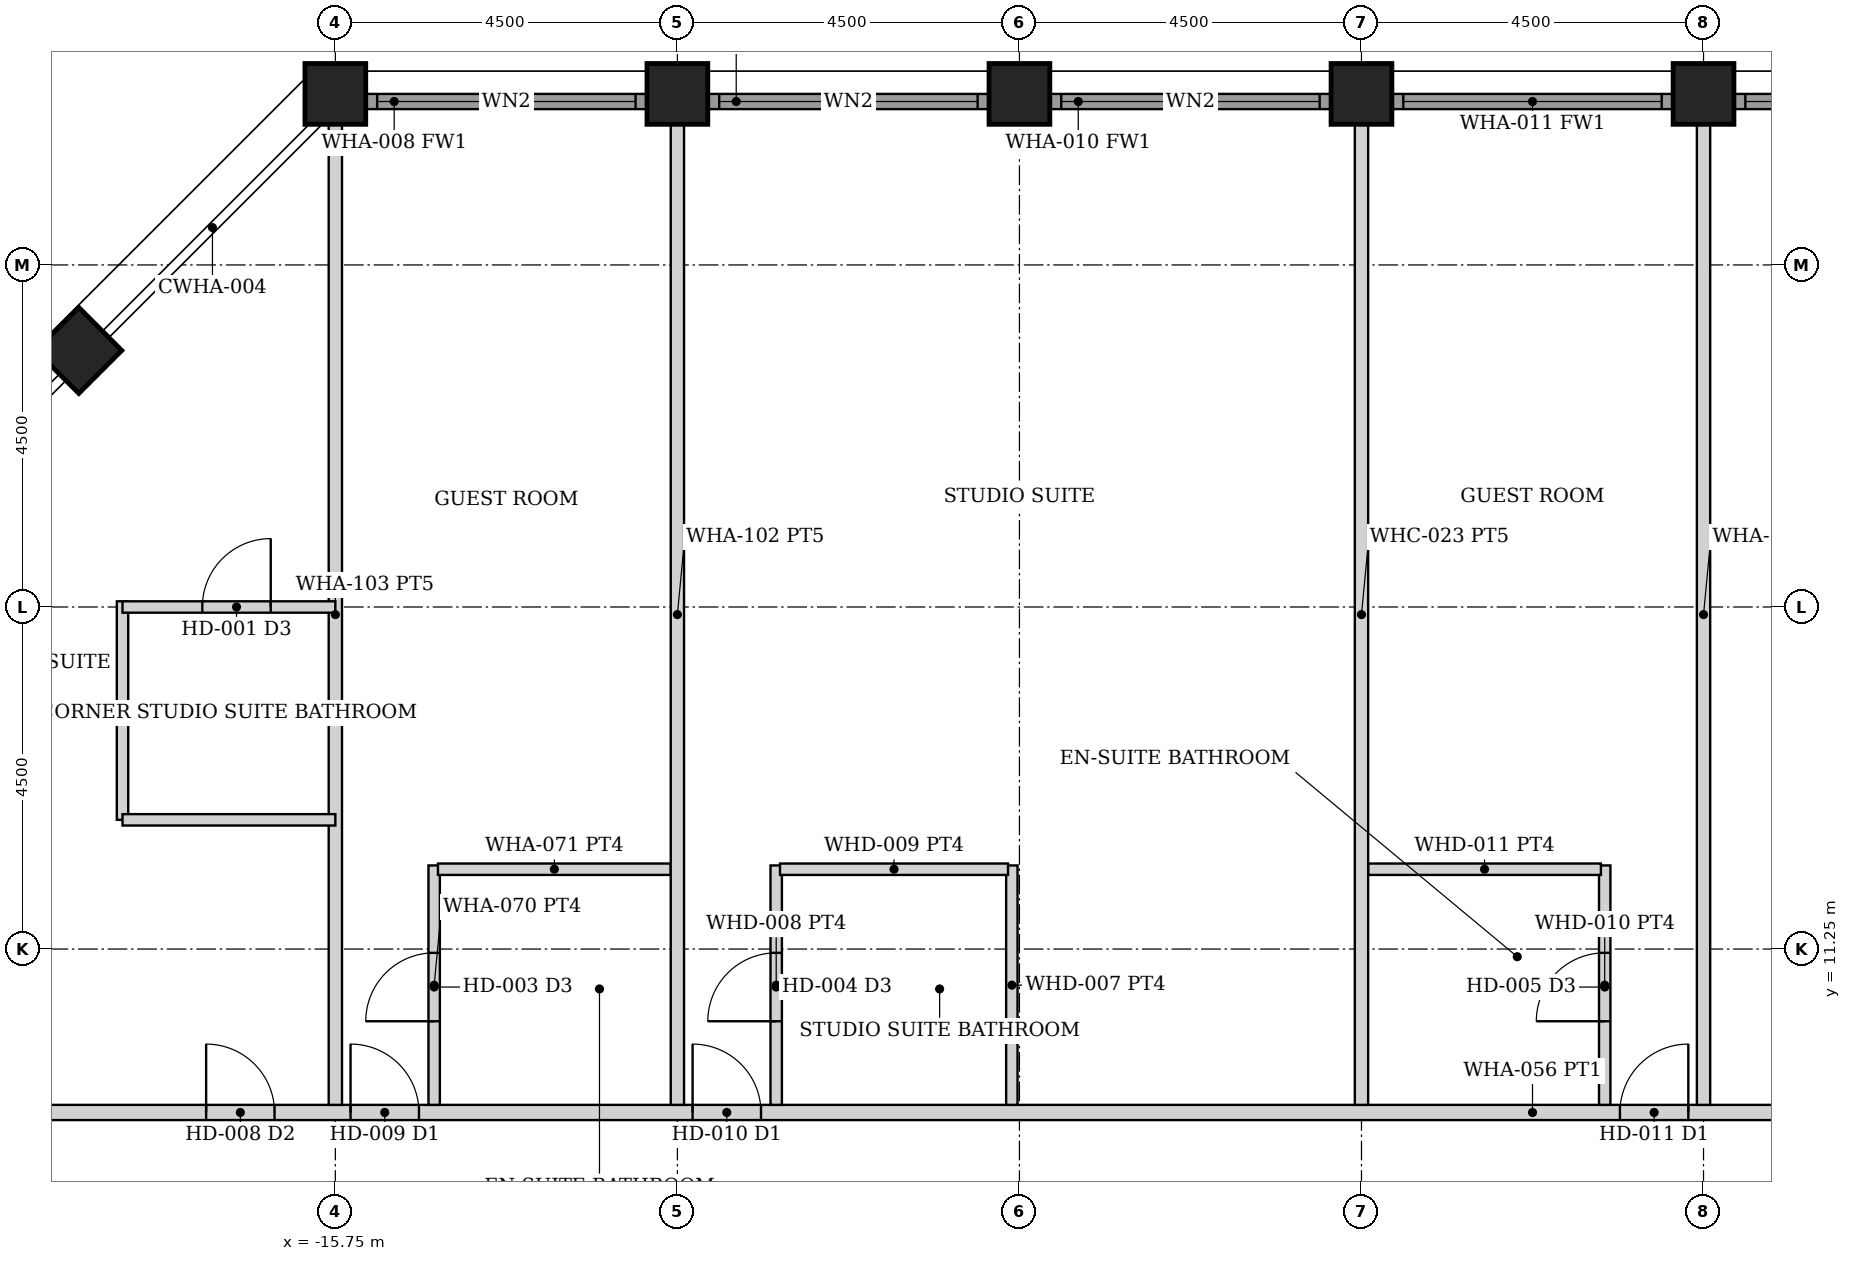
"""IFC4 building model, lengths in metres.
Left out: names, types, materials, properties, quantities, classifications, styles, units other than length and angle.
Written with IfcOpenShell. Run it as: python <this file> out.ifc"""

import sys

from ifc_helpers import new_model, si_unit, direction, frame, frame_2d, origin, origin_2d, place, context, subcontext, project, spatial, rectangle, hollow_rectangle, extrude, element, fill, save


model = new_model("IFC4")
c1 = context("Model", 3, precision=1e-05, world=origin(), true_north=direction((0.0, 1.0)))
c2 = subcontext(c1, "Body", "Model", "MODEL_VIEW")
j1 = project(units=[si_unit("LENGTHUNIT", "METRE"), si_unit("PLANEANGLEUNIT", "RADIAN")], contexts=[c1])
p1 = place(None, origin())
s1 = spatial("IfcSite", under=j1, at=p1, CompositionType="ELEMENT")
p2 = place(p1, origin())
s2 = spatial("IfcBuilding", under=s1, at=p2, CompositionType="ELEMENT")
p3 = place(p2, frame((0.0, 0.0, 150.8)))
s3 = spatial("IfcBuildingStorey", under=s2, at=p3, CompositionType="ELEMENT", Elevation=150.8)
for number, where, z_axis, x_axis in (
    (1, (-15.75, 22.5, 0.0), (0.0, 0.0, 1.0), (0.0, 1.0, 0.0)),
    (2, (-11.25, 22.5, 0.0), (0.0, 0.0, 1.0), (0.0, 1.0, 0.0)),
    (3, (-6.75, 22.5, 0.0), (0.0, 0.0, 1.0), (0.0, 1.0, 0.0)),
    (4, (-2.25, 22.5, 0.0), (0.0, 0.0, 1.0), (0.0, 1.0, 0.0)),
    (5, (2.25, 22.5, 0.0), (0.0, 0.0, 1.0), (0.0, 1.0, 0.0)),
    (6, (-19.125, 19.125, 0.0), (0.0, 0.0, 1.0), (0.707, -0.707, 0.0)),
):
    element("IfcColumn", number, at=place(p3, frame(where, z_axis=z_axis, x_axis=x_axis)), inside=s3, PredefinedType="COLUMN", context=c2, shape_type="SweptSolid", body=[
        extrude(hollow_rectangle(XDim=0.8, YDim=0.8, WallThickness=0.05, at=origin_2d()), origin(), (0.0, 0.0, 1.0), 3.6),
    ])
p4 = place(p3, frame((-15.345, 22.4, 0.0), z_axis=(0.0, 0.0, 1.0), x_axis=(1.0, 0.0, 0.0)))
e7 = element("IfcWall", 7, at=p4, inside=s3, PredefinedType="SOLIDWALL", context=c2, shape_type="SweptSolid", body=[
    extrude(rectangle(XDim=3.69, YDim=0.2, at=frame_2d((1.845, 0.0))), origin(), (0.0, 0.0, 1.0), 2.479),
])
p5 = place(p4, frame((0.145, 0.0, 0.3)))
e8 = element("IfcOpeningElement", 8, at=p5, cuts=e7, PredefinedType="OPENING", context=c2, shape_type="SweptSolid", body=[
    extrude(rectangle(XDim=3.4, YDim=2.029, at=frame_2d((1.7, 1.015))), frame((0.0, 0.11, 0.0), z_axis=(0.0, -1.0, 0.0), x_axis=(1.0, 0.0, 0.0)), (0.0, 0.0, 1.0), 0.22),
])
p6 = place(p3, frame((-10.845, 22.4, 0.0), z_axis=(0.0, 0.0, 1.0), x_axis=(1.0, 0.0, 0.0)))
e9 = element("IfcWall", 9, at=p6, inside=s3, PredefinedType="SOLIDWALL", context=c2, shape_type="SweptSolid", body=[
    extrude(rectangle(XDim=3.69, YDim=0.2, at=frame_2d((1.845, 0.0))), origin(), (0.0, 0.0, 1.0), 2.479),
])
p7 = place(p6, frame((0.145, 0.0, 0.3)))
e10 = element("IfcOpeningElement", 10, at=p7, cuts=e9, PredefinedType="OPENING", context=c2, shape_type="SweptSolid", body=[
    extrude(rectangle(XDim=3.4, YDim=2.029, at=frame_2d((1.7, 1.015))), frame((0.0, 0.11, 0.0), z_axis=(0.0, -1.0, 0.0), x_axis=(1.0, 0.0, 0.0)), (0.0, 0.0, 1.0), 0.22),
])
p8 = place(p3, frame((-6.345, 22.4, 0.0), z_axis=(0.0, 0.0, 1.0), x_axis=(1.0, 0.0, 0.0)))
e11 = element("IfcWall", 11, at=p8, inside=s3, PredefinedType="SOLIDWALL", context=c2, shape_type="SweptSolid", body=[
    extrude(rectangle(XDim=3.69, YDim=0.2, at=frame_2d((1.845, 0.0))), origin(), (0.0, 0.0, 1.0), 2.479),
])
p9 = place(p8, frame((0.145, 0.0, 0.3)))
e12 = element("IfcOpeningElement", 12, at=p9, cuts=e11, PredefinedType="OPENING", context=c2, shape_type="SweptSolid", body=[
    extrude(rectangle(XDim=3.4, YDim=2.029, at=frame_2d((1.7, 1.015))), frame((0.0, 0.11, 0.0), z_axis=(0.0, -1.0, 0.0), x_axis=(1.0, 0.0, 0.0)), (0.0, 0.0, 1.0), 0.22),
])
p10 = place(p3, frame((-1.845, 22.4, 0.0), z_axis=(0.0, 0.0, 1.0), x_axis=(1.0, 0.0, 0.0)))
e13 = element("IfcWall", 13, at=p10, inside=s3, PredefinedType="SOLIDWALL", context=c2, shape_type="SweptSolid", body=[
    extrude(rectangle(XDim=3.69, YDim=0.2, at=frame_2d((1.845, 0.0))), origin(), (0.0, 0.0, 1.0), 2.479),
])
p11 = place(p10, frame((0.145, 0.0, 0.3)))
e14 = element("IfcOpeningElement", 14, at=p11, cuts=e13, PredefinedType="OPENING", context=c2, shape_type="SweptSolid", body=[
    extrude(rectangle(XDim=3.4, YDim=2.029, at=frame_2d((1.7, 1.015))), frame((0.0, 0.11, 0.0), z_axis=(0.0, -1.0, 0.0), x_axis=(1.0, 0.0, 0.0)), (0.0, 0.0, 1.0), 0.22),
])
p12 = place(p3, frame((2.655, 22.4, 0.0), z_axis=(0.0, 0.0, 1.0), x_axis=(1.0, 0.0, 0.0)))
e15 = element("IfcWall", 15, at=p12, inside=s3, PredefinedType="SOLIDWALL", context=c2, shape_type="SweptSolid", body=[
    extrude(rectangle(XDim=3.69, YDim=0.2, at=frame_2d((1.845, 0.0))), origin(), (0.0, 0.0, 1.0), 2.479),
])
p13 = place(p12, frame((0.145, 0.0, 0.3)))
e16 = element("IfcOpeningElement", 16, at=p13, cuts=e15, PredefinedType="OPENING", context=c2, shape_type="SweptSolid", body=[
    extrude(rectangle(XDim=3.4, YDim=2.029, at=frame_2d((1.7, 1.015))), frame((0.0, 0.11, 0.0), z_axis=(0.0, -1.0, 0.0), x_axis=(1.0, 0.0, 0.0)), (0.0, 0.0, 1.0), 0.22),
])
p14 = place(p3, frame((-22.3, 9.1, 0.0), z_axis=(0.0, 0.0, 1.0), x_axis=(1.0, 0.0, 0.0)))
e17 = element("IfcWall", 17, at=p14, inside=s3, PredefinedType="PARTITIONING", context=c2, shape_type="SweptSolid", body=[
    extrude(rectangle(XDim=44.6, YDim=0.2, at=frame_2d((22.3, 0.0))), origin(), (0.0, 0.0, 1.0), 2.473),
])
p15 = place(p14, frame((6.75, 0.0, 0.0)))
e18 = element("IfcOpeningElement", 18, at=p15, cuts=e17, PredefinedType="OPENING", context=c2, shape_type="SweptSolid", body=[
    extrude(rectangle(XDim=0.9, YDim=2.1, at=frame_2d((0.45, 1.05))), frame((0.0, 0.11, 0.0), z_axis=(0.0, -1.0, 0.0), x_axis=(1.0, 0.0, 0.0)), (0.0, 0.0, 1.0), 0.22),
])
p16 = place(p14, frame((11.25, 0.0, 0.0)))
e19 = element("IfcOpeningElement", 19, at=p16, cuts=e17, PredefinedType="OPENING", context=c2, shape_type="SweptSolid", body=[
    extrude(rectangle(XDim=0.9, YDim=2.1, at=frame_2d((0.45, 1.05))), frame((0.0, 0.11, 0.0), z_axis=(0.0, -1.0, 0.0), x_axis=(1.0, 0.0, 0.0)), (0.0, 0.0, 1.0), 0.22),
])
p17 = place(p14, frame((23.45, 0.0, 0.0)))
e20 = element("IfcOpeningElement", 20, at=p17, cuts=e17, PredefinedType="OPENING", context=c2, shape_type="SweptSolid", body=[
    extrude(rectangle(XDim=0.9, YDim=2.1, at=frame_2d((0.45, 1.05))), frame((0.0, 0.11, 0.0), z_axis=(0.0, -1.0, 0.0), x_axis=(1.0, 0.0, 0.0)), (0.0, 0.0, 1.0), 0.22),
])
p18 = place(p14, frame((32.45, 0.0, 0.0)))
e21 = element("IfcOpeningElement", 21, at=p18, cuts=e17, PredefinedType="OPENING", context=c2, shape_type="SweptSolid", body=[
    extrude(rectangle(XDim=0.9, YDim=2.1, at=frame_2d((0.45, 1.05))), frame((0.0, 0.11, 0.0), z_axis=(0.0, -1.0, 0.0), x_axis=(1.0, 0.0, 0.0)), (0.0, 0.0, 1.0), 0.22),
])
p19 = place(p14, frame((33.75, 0.0, 0.0)))
e22 = element("IfcOpeningElement", 22, at=p19, cuts=e17, PredefinedType="OPENING", context=c2, shape_type="SweptSolid", body=[
    extrude(rectangle(XDim=0.9, YDim=2.1, at=frame_2d((0.45, 1.05))), frame((0.0, 0.11, 0.0), z_axis=(0.0, -1.0, 0.0), x_axis=(1.0, 0.0, 0.0)), (0.0, 0.0, 1.0), 0.22),
])
p20 = place(p14, frame((38.85, 0.0, 0.0)))
e23 = element("IfcOpeningElement", 23, at=p20, cuts=e17, PredefinedType="OPENING", context=c2, shape_type="SweptSolid", body=[
    extrude(rectangle(XDim=0.9, YDim=2.1, at=frame_2d((0.45, 1.05))), frame((0.0, 0.11, 0.0), z_axis=(0.0, -1.0, 0.0), x_axis=(1.0, 0.0, 0.0)), (0.0, 0.0, 1.0), 0.22),
])
p21 = place(p14, frame((4.85, 0.0, 0.0)))
e24 = element("IfcOpeningElement", 24, at=p21, cuts=e17, PredefinedType="OPENING", context=c2, shape_type="SweptSolid", body=[
    extrude(rectangle(XDim=0.9, YDim=2.1, at=frame_2d((0.45, 1.05))), frame((0.0, 0.11, 0.0), z_axis=(0.0, -1.0, 0.0), x_axis=(1.0, 0.0, 0.0)), (0.0, 0.0, 1.0), 0.22),
])
p22 = place(p3, frame((-14.45, 9.2, 0.0), z_axis=(0.0, 0.0, 1.0), x_axis=(0.0, 1.0, 0.0)))
e25 = element("IfcWall", 25, at=p22, inside=s3, PredefinedType="PARTITIONING", context=c2, shape_type="SweptSolid", body=[
    extrude(rectangle(XDim=3.15, YDim=0.15, at=frame_2d((1.575, 0.0))), origin(), (0.0, 0.0, 1.0), 2.473),
])
p23 = place(p22, frame((1.1, 0.0, 0.0)))
e26 = element("IfcOpeningElement", 26, at=p23, cuts=e25, PredefinedType="OPENING", context=c2, shape_type="SweptSolid", body=[
    extrude(rectangle(XDim=0.9, YDim=2.1, at=frame_2d((0.45, 1.05))), frame((0.0, 0.085, 0.0), z_axis=(0.0, -1.0, 0.0), x_axis=(1.0, 0.0, 0.0)), (0.0, 0.0, 1.0), 0.17),
])
p24 = place(p3, frame((-14.4, 12.3, 0.0), z_axis=(0.0, 0.0, 1.0), x_axis=(1.0, 0.0, 0.0)))
e27 = element("IfcWall", 27, at=p24, inside=s3, PredefinedType="PARTITIONING", context=c2, shape_type="SweptSolid", body=[
    extrude(rectangle(XDim=3.062, YDim=0.15, at=frame_2d((1.531, 0.0))), origin(), (0.0, 0.0, 1.0), 2.473),
])
p25 = place(p3, frame((-9.95, 9.2, 0.0), z_axis=(0.0, 0.0, 1.0), x_axis=(0.0, 1.0, 0.0)))
e28 = element("IfcWall", 28, at=p25, inside=s3, PredefinedType="PARTITIONING", context=c2, shape_type="SweptSolid", body=[
    extrude(rectangle(XDim=3.15, YDim=0.15, at=frame_2d((1.575, 0.0))), origin(), (0.0, 0.0, 1.0), 2.473),
])
p26 = place(p25, frame((1.1, 0.0, 0.0)))
e29 = element("IfcOpeningElement", 29, at=p26, cuts=e28, PredefinedType="OPENING", context=c2, shape_type="SweptSolid", body=[
    extrude(rectangle(XDim=0.9, YDim=2.1, at=frame_2d((0.45, 1.05))), frame((0.0, 0.085, 0.0), z_axis=(0.0, -1.0, 0.0), x_axis=(1.0, 0.0, 0.0)), (0.0, 0.0, 1.0), 0.17),
])
p27 = place(p3, frame((-6.85, 9.2, 0.0), z_axis=(0.0, 0.0, 1.0), x_axis=(0.0, 1.0, 0.0)))
e30 = element("IfcWall", 30, at=p27, inside=s3, PredefinedType="PARTITIONING", context=c2, shape_type="SweptSolid", body=[
    extrude(rectangle(XDim=3.15, YDim=0.15, at=frame_2d((1.575, 0.0))), origin(), (0.0, 0.0, 1.0), 2.473),
])
p28 = place(p3, frame((-9.9, 12.3, 0.0), z_axis=(0.0, 0.0, 1.0), x_axis=(1.0, 0.0, 0.0)))
e31 = element("IfcWall", 31, at=p28, inside=s3, PredefinedType="PARTITIONING", context=c2, shape_type="SweptSolid", body=[
    extrude(rectangle(XDim=3.0, YDim=0.15, at=frame_2d((1.5, 0.0))), origin(), (0.0, 0.0, 1.0), 2.473),
])
p29 = place(p3, frame((0.95, 9.2, 0.0), z_axis=(0.0, 0.0, 1.0), x_axis=(0.0, 1.0, 0.0)))
e32 = element("IfcWall", 32, at=p29, inside=s3, PredefinedType="PARTITIONING", context=c2, shape_type="SweptSolid", body=[
    extrude(rectangle(XDim=3.15, YDim=0.15, at=frame_2d((1.575, 0.0))), origin(), (0.0, 0.0, 1.0), 2.473),
])
p30 = place(p29, frame((1.1, 0.0, 0.0)))
e33 = element("IfcOpeningElement", 33, at=p30, cuts=e32, PredefinedType="OPENING", context=c2, shape_type="SweptSolid", body=[
    extrude(rectangle(XDim=0.9, YDim=2.1, at=frame_2d((0.45, 1.05))), frame((0.0, 0.085, 0.0), z_axis=(0.0, -1.0, 0.0), x_axis=(1.0, 0.0, 0.0)), (0.0, 0.0, 1.0), 0.17),
])
p31 = place(p3, frame((-2.163, 12.3, 0.0), z_axis=(0.0, 0.0, 1.0), x_axis=(1.0, 0.0, 0.0)))
e34 = element("IfcWall", 34, at=p31, inside=s3, PredefinedType="PARTITIONING", context=c2, shape_type="SweptSolid", body=[
    extrude(rectangle(XDim=3.062, YDim=0.15, at=frame_2d((1.531, 0.0))), origin(), (0.0, 0.0, 1.0), 2.473),
])
for number, where, z_axis, x_axis in (
    (35, (-15.75, 9.2, 0.0), (0.0, 0.0, 1.0), (0.0, 1.0, 0.0)),
    (36, (-11.25, 9.2, 0.0), (0.0, 0.0, 1.0), (0.0, 1.0, 0.0)),
    (37, (-2.25, 9.2, 0.0), (0.0, 0.0, 1.0), (0.0, 1.0, 0.0)),
    (38, (2.25, 9.2, 0.0), (0.0, 0.0, 1.0), (0.0, 1.0, 0.0)),
):
    element("IfcWall", number, at=place(p3, frame(where, z_axis=z_axis, x_axis=x_axis)), inside=s3, PredefinedType="PARTITIONING", context=c2, shape_type="SweptSolid", body=[
        extrude(rectangle(XDim=12.9, YDim=0.175, at=frame_2d((6.45, 0.0))), origin(), (0.0, 0.0, 1.0), 2.473),
    ])
p32 = place(p3, frame((-18.55, 12.95, 0.0), z_axis=(0.0, 0.0, 1.0), x_axis=(0.0, 1.0, 0.0)))
e39 = element("IfcWall", 39, at=p32, inside=s3, PredefinedType="PARTITIONING", context=c2, shape_type="SweptSolid", body=[
    extrude(rectangle(XDim=2.875, YDim=0.15, at=frame_2d((1.438, 0.0))), origin(), (0.0, 0.0, 1.0), 2.473),
])
p33 = place(p3, frame((-18.55, 12.95, 0.0), z_axis=(0.0, 0.0, 1.0), x_axis=(1.0, 0.0, 0.0)))
e40 = element("IfcWall", 40, at=p33, inside=s3, PredefinedType="PARTITIONING", context=c2, shape_type="SweptSolid", body=[
    extrude(rectangle(XDim=2.8, YDim=0.15, at=frame_2d((1.4, 0.0))), origin(), (0.0, 0.0, 1.0), 2.473),
])
p34 = place(p3, frame((-18.55, 15.75, 0.0), z_axis=(0.0, 0.0, 1.0), x_axis=(1.0, 0.0, 0.0)))
e41 = element("IfcWall", 41, at=p34, inside=s3, PredefinedType="PARTITIONING", context=c2, shape_type="SweptSolid", body=[
    extrude(rectangle(XDim=2.8, YDim=0.15, at=frame_2d((1.4, 0.0))), origin(), (0.0, 0.0, 1.0), 2.473),
])
p35 = place(p34, frame((1.05, 0.0, 0.0)))
e42 = element("IfcOpeningElement", 42, at=p35, cuts=e41, PredefinedType="OPENING", context=c2, shape_type="SweptSolid", body=[
    extrude(rectangle(XDim=0.9, YDim=2.1, at=frame_2d((0.45, 1.05))), frame((0.0, 0.085, 0.0), z_axis=(0.0, -1.0, 0.0), x_axis=(1.0, 0.0, 0.0)), (0.0, 0.0, 1.0), 0.17),
])
p36 = place(p5, origin())
e43 = element("IfcWindow", 43, at=p36, inside=s3, PartitioningType="SINGLE_PANEL", PredefinedType="WINDOW", context=c2, shape_type="SweptSolid", body=[
    extrude(rectangle(XDim=3.4, YDim=2.029, at=frame_2d((1.7, 1.015))), frame((0.0, 0.03, 0.0), z_axis=(0.0, -1.0, 0.0), x_axis=(1.0, 0.0, 0.0)), (0.0, 0.0, 1.0), 0.06),
])
fill(e8, e43)
p37 = place(p7, origin())
e44 = element("IfcWindow", 44, at=p37, inside=s3, PartitioningType="SINGLE_PANEL", PredefinedType="WINDOW", context=c2, shape_type="SweptSolid", body=[
    extrude(rectangle(XDim=3.4, YDim=2.029, at=frame_2d((1.7, 1.015))), frame((0.0, 0.03, 0.0), z_axis=(0.0, -1.0, 0.0), x_axis=(1.0, 0.0, 0.0)), (0.0, 0.0, 1.0), 0.06),
])
fill(e10, e44)
p38 = place(p9, origin())
e45 = element("IfcWindow", 45, at=p38, inside=s3, PartitioningType="SINGLE_PANEL", PredefinedType="WINDOW", context=c2, shape_type="SweptSolid", body=[
    extrude(rectangle(XDim=3.4, YDim=2.029, at=frame_2d((1.7, 1.015))), frame((0.0, 0.03, 0.0), z_axis=(0.0, -1.0, 0.0), x_axis=(1.0, 0.0, 0.0)), (0.0, 0.0, 1.0), 0.06),
])
fill(e12, e45)
p39 = place(p11, origin())
e46 = element("IfcWindow", 46, at=p39, inside=s3, PartitioningType="SINGLE_PANEL", PredefinedType="WINDOW", context=c2, shape_type="SweptSolid", body=[
    extrude(rectangle(XDim=3.4, YDim=2.029, at=frame_2d((1.7, 1.015))), frame((0.0, 0.03, 0.0), z_axis=(0.0, -1.0, 0.0), x_axis=(1.0, 0.0, 0.0)), (0.0, 0.0, 1.0), 0.06),
])
fill(e14, e46)
p40 = place(p13, origin())
e47 = element("IfcWindow", 47, at=p40, inside=s3, PartitioningType="SINGLE_PANEL", PredefinedType="WINDOW", context=c2, shape_type="SweptSolid", body=[
    extrude(rectangle(XDim=3.4, YDim=2.029, at=frame_2d((1.7, 1.015))), frame((0.0, 0.03, 0.0), z_axis=(0.0, -1.0, 0.0), x_axis=(1.0, 0.0, 0.0)), (0.0, 0.0, 1.0), 0.06),
])
fill(e16, e47)
p41 = place(p15, origin())
e48 = element("IfcDoor", 48, at=p41, inside=s3, OperationType="SINGLE_SWING_LEFT", PredefinedType="DOOR", context=c2, shape_type="SweptSolid", body=[
    extrude(rectangle(XDim=0.9, YDim=2.1, at=frame_2d((0.45, 1.05))), frame((0.0, 0.025, 0.0), z_axis=(0.0, -1.0, 0.0), x_axis=(1.0, 0.0, 0.0)), (0.0, 0.0, 1.0), 0.05),
])
fill(e18, e48)
p42 = place(p23, origin())
e49 = element("IfcDoor", 49, at=p42, inside=s3, OperationType="SINGLE_SWING_LEFT", PredefinedType="DOOR", context=c2, shape_type="SweptSolid", body=[
    extrude(rectangle(XDim=0.9, YDim=2.1, at=frame_2d((0.45, 1.05))), frame((0.0, 0.025, 0.0), z_axis=(0.0, -1.0, 0.0), x_axis=(1.0, 0.0, 0.0)), (0.0, 0.0, 1.0), 0.05),
])
fill(e26, e49)
p43 = place(p16, origin())
e50 = element("IfcDoor", 50, at=p43, inside=s3, OperationType="SINGLE_SWING_LEFT", PredefinedType="DOOR", context=c2, shape_type="SweptSolid", body=[
    extrude(rectangle(XDim=0.9, YDim=2.1, at=frame_2d((0.45, 1.05))), frame((0.0, 0.025, 0.0), z_axis=(0.0, -1.0, 0.0), x_axis=(1.0, 0.0, 0.0)), (0.0, 0.0, 1.0), 0.05),
])
fill(e19, e50)
p44 = place(p26, origin())
e51 = element("IfcDoor", 51, at=p44, inside=s3, OperationType="SINGLE_SWING_LEFT", PredefinedType="DOOR", context=c2, shape_type="SweptSolid", body=[
    extrude(rectangle(XDim=0.9, YDim=2.1, at=frame_2d((0.45, 1.05))), frame((0.0, 0.025, 0.0), z_axis=(0.0, -1.0, 0.0), x_axis=(1.0, 0.0, 0.0)), (0.0, 0.0, 1.0), 0.05),
])
fill(e29, e51)
p45 = place(p17, origin())
e52 = element("IfcDoor", 52, at=p45, inside=s3, OperationType="SINGLE_SWING_RIGHT", PredefinedType="DOOR", context=c2, shape_type="SweptSolid", body=[
    extrude(rectangle(XDim=0.9, YDim=2.1, at=frame_2d((0.45, 1.05))), frame((0.0, 0.025, 0.0), z_axis=(0.0, -1.0, 0.0), x_axis=(1.0, 0.0, 0.0)), (0.0, 0.0, 1.0), 0.05),
])
fill(e20, e52)
p46 = place(p30, origin())
e53 = element("IfcDoor", 53, at=p46, inside=s3, OperationType="SINGLE_SWING_LEFT", PredefinedType="DOOR", context=c2, shape_type="SweptSolid", body=[
    extrude(rectangle(XDim=0.9, YDim=2.1, at=frame_2d((0.45, 1.05))), frame((0.0, 0.025, 0.0), z_axis=(0.0, -1.0, 0.0), x_axis=(1.0, 0.0, 0.0)), (0.0, 0.0, 1.0), 0.05),
])
fill(e33, e53)
p47 = place(p21, origin())
e54 = element("IfcDoor", 54, at=p47, inside=s3, OperationType="SINGLE_SWING_LEFT", PredefinedType="DOOR", context=c2, shape_type="SweptSolid", body=[
    extrude(rectangle(XDim=0.9, YDim=2.1, at=frame_2d((0.45, 1.05))), frame((0.0, 0.025, 0.0), z_axis=(0.0, -1.0, 0.0), x_axis=(1.0, 0.0, 0.0)), (0.0, 0.0, 1.0), 0.05),
])
fill(e24, e54)
p48 = place(p35, origin())
e55 = element("IfcDoor", 55, at=p48, inside=s3, OperationType="SINGLE_SWING_RIGHT", PredefinedType="DOOR", context=c2, shape_type="SweptSolid", body=[
    extrude(rectangle(XDim=0.9, YDim=2.1, at=frame_2d((0.45, 1.05))), frame((0.0, 0.025, 0.0), z_axis=(0.0, -1.0, 0.0), x_axis=(1.0, 0.0, 0.0)), (0.0, 0.0, 1.0), 0.05),
])
fill(e42, e55)
save(model, sys.argv[1])
